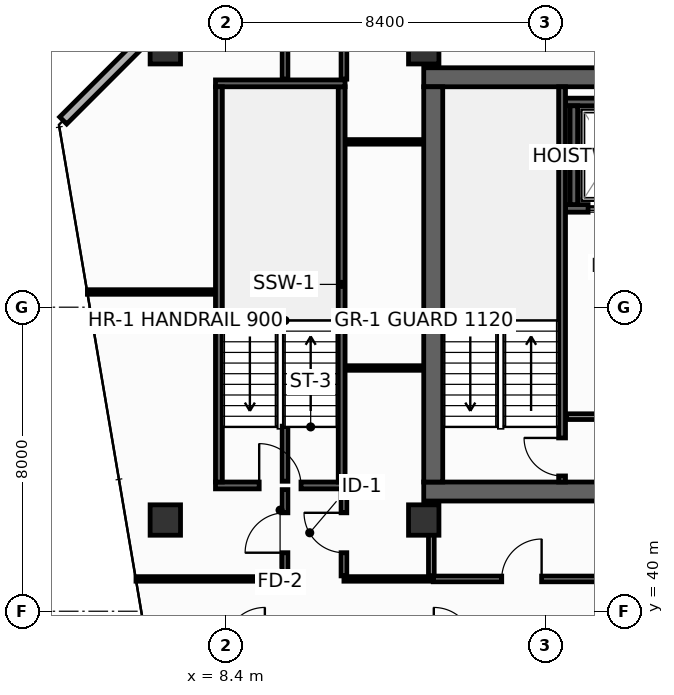
"""IFC4 building model, lengths in metres.
Left out: names, types, materials, properties, quantities, classifications, styles, units other than length and angle.
Written with IfcOpenShell. Run it as: python <this file> out.ifc"""

import sys

from ifc_helpers import new_model, si_unit, direction, frame, frame_2d, origin, origin_2d, place, context, subcontext, project, spatial, rectangle, hollow_rectangle, extrude, element, fill, save


model = new_model("IFC4")
c1 = context("Model", 3, precision=1e-05, world=origin(), true_north=direction((0.0, 1.0)))
c2 = subcontext(c1, "Body", "Model", "MODEL_VIEW")
j1 = project(units=[si_unit("LENGTHUNIT", "METRE"), si_unit("PLANEANGLEUNIT", "RADIAN")], contexts=[c1])
p1 = place(None, origin())
s1 = spatial("IfcSite", under=j1, at=p1, CompositionType="ELEMENT")
p2 = place(p1, origin())
s2 = spatial("IfcBuilding", under=s1, at=p2, CompositionType="ELEMENT")
p3 = place(p2, frame((0.0, 0.0, 205.6)))
s3 = spatial("IfcBuildingStorey", under=s2, at=p3, CompositionType="ELEMENT", Elevation=205.6)
p4 = place(p3, frame((13.6, 43.15, 0.0), z_axis=(0.0, 0.0, 1.0), x_axis=(1.0, 0.0, 0.0)))
e1 = element("IfcWall", 1, at=p4, inside=s3, PredefinedType="SHEAR", context=c2, shape_type="SweptSolid", body=[
    extrude(rectangle(XDim=32.7, YDim=0.5, at=frame_2d((16.35, 0.0))), origin(), (0.0, 0.0, 1.0), 3.55),
])
p5 = place(p4, frame((5.4, 0.0, 0.0)))
e2 = element("IfcOpeningElement", 2, at=p5, cuts=e1, PredefinedType="OPENING", context=c2, shape_type="SweptSolid", body=[
    extrude(rectangle(XDim=1.1, YDim=2.15, at=frame_2d((0.55, 1.075))), frame((0.0, 0.26, 0.0), z_axis=(0.0, -1.0, 0.0), x_axis=(1.0, 0.0, 0.0)), (0.0, 0.0, 1.0), 0.52),
])
p6 = place(p4, frame((25.6, 0.0, 0.0)))
e3 = element("IfcOpeningElement", 3, at=p6, cuts=e1, PredefinedType="OPENING", context=c2, shape_type="SweptSolid", body=[
    extrude(rectangle(XDim=1.1, YDim=2.15, at=frame_2d((0.55, 1.075))), frame((0.0, 0.26, 0.0), z_axis=(0.0, -1.0, 0.0), x_axis=(1.0, 0.0, 0.0)), (0.0, 0.0, 1.0), 0.52),
])
p7 = place(p3, frame((13.6, 54.05, 0.0), z_axis=(0.0, 0.0, 1.0), x_axis=(1.0, 0.0, 0.0)))
e4 = element("IfcWall", 4, at=p7, inside=s3, PredefinedType="SHEAR", context=c2, shape_type="SweptSolid", body=[
    extrude(rectangle(XDim=32.7, YDim=0.5, at=frame_2d((16.35, 0.0))), origin(), (0.0, 0.0, 1.0), 3.55),
])
p8 = place(p3, frame((13.85, 43.4, 0.0), z_axis=(0.0, 0.0, 1.0), x_axis=(0.0, 1.0, 0.0)))
e5 = element("IfcWall", 5, at=p8, inside=s3, PredefinedType="SHEAR", context=c2, shape_type="SweptSolid", body=[
    extrude(rectangle(XDim=10.4, YDim=0.5, at=frame_2d((5.2, 0.0))), origin(), (0.0, 0.0, 1.0), 3.55),
])
for number, where, z_axis, x_axis in (
    (6, (6.8, 54.8, 0.0), (0.0, 0.0, 1.0), (1.0, 0.0, 0.0)),
    (7, (13.6, 54.8, 0.0), (0.0, 0.0, 1.0), (1.0, 0.0, 0.0)),
    (8, (6.8, 42.4, 0.0), (0.0, 0.0, 1.0), (1.0, 0.0, 0.0)),
    (9, (13.6, 42.4, 0.0), (0.0, 0.0, 1.0), (1.0, 0.0, 0.0)),
):
    element("IfcColumn", number, at=place(p3, frame(where, z_axis=z_axis, x_axis=x_axis)), inside=s3, PredefinedType="COLUMN", context=c2, shape_type="SweptSolid", body=[
        extrude(hollow_rectangle(XDim=0.8, YDim=0.8, WallThickness=0.036, at=origin_2d()), origin(), (0.0, 0.0, 1.0), 3.8),
    ])
p9 = place(p3, frame((17.33, 50.6, 0.0), z_axis=(0.0, 0.0, 1.0), x_axis=(1.0, 0.0, 0.0)))
e10 = element("IfcWall", 10, at=p9, inside=s3, PredefinedType="SHEAR", context=c2, shape_type="SweptSolid", body=[
    extrude(rectangle(XDim=2.52, YDim=0.2, at=frame_2d((1.26, 0.0))), origin(), (0.0, 0.0, 1.0), 3.55),
])
p10 = place(p9, frame((0.595, 0.0, 0.0)))
e11 = element("IfcOpeningElement", 11, at=p10, cuts=e10, PredefinedType="OPENING", context=c2, shape_type="SweptSolid", body=[
    extrude(rectangle(XDim=1.25, YDim=2.3, at=frame_2d((0.625, 1.15))), frame((0.0, 0.11, 0.0), z_axis=(0.0, -1.0, 0.0), x_axis=(1.0, 0.0, 0.0)), (0.0, 0.0, 1.0), 0.22),
])
p11 = place(p3, frame((17.33, 53.4, 0.0), z_axis=(0.0, 0.0, 1.0), x_axis=(1.0, 0.0, 0.0)))
e12 = element("IfcWall", 12, at=p11, inside=s3, PredefinedType="SHEAR", context=c2, shape_type="SweptSolid", body=[
    extrude(rectangle(XDim=2.52, YDim=0.2, at=frame_2d((1.26, 0.0))), origin(), (0.0, 0.0, 1.0), 3.55),
])
p12 = place(p3, frame((17.55, 50.7, 0.0), z_axis=(0.0, 0.0, 1.0), x_axis=(0.0, 1.0, 0.0)))
e13 = element("IfcWall", 13, at=p12, inside=s3, PredefinedType="SHEAR", context=c2, shape_type="SweptSolid", body=[
    extrude(rectangle(XDim=2.6, YDim=0.2, at=frame_2d((1.3, 0.0))), origin(), (0.0, 0.0, 1.0), 3.55),
])
p13 = place(p3, frame((17.24, 43.4, 0.0), z_axis=(0.0, 0.0, 1.0), x_axis=(0.0, 1.0, 0.0)))
e14 = element("IfcWall", 14, at=p13, inside=s3, PredefinedType="SHEAR", context=c2, shape_type="SweptSolid", body=[
    extrude(rectangle(XDim=10.4, YDim=0.18, at=frame_2d((5.2, 0.0))), origin(), (0.0, 0.0, 1.0), 3.55),
])
p14 = place(p13, frame((0.16, 0.0, 0.0)))
e15 = element("IfcOpeningElement", 15, at=p14, cuts=e14, PredefinedType="OPENING", context=c2, shape_type="SweptSolid", body=[
    extrude(rectangle(XDim=1.0, YDim=2.15, at=frame_2d((0.5, 1.075))), frame((0.0, 0.1, 0.0), z_axis=(0.0, -1.0, 0.0), x_axis=(1.0, 0.0, 0.0)), (0.0, 0.0, 1.0), 0.2),
])
p15 = place(p3, frame((8.12, 43.31, 0.0), z_axis=(0.0, 0.0, 1.0), x_axis=(1.0, 0.0, 0.0)))
e16 = element("IfcWall", 16, at=p15, inside=s3, PredefinedType="SHEAR", context=c2, shape_type="SweptSolid", body=[
    extrude(rectangle(XDim=3.41, YDim=0.18, at=frame_2d((1.705, 0.0))), origin(), (0.0, 0.0, 1.0), 3.55),
])
p16 = place(p15, frame((1.15, 0.0, 0.0)))
e17 = element("IfcOpeningElement", 17, at=p16, cuts=e16, PredefinedType="OPENING", context=c2, shape_type="SweptSolid", body=[
    extrude(rectangle(XDim=1.1, YDim=2.15, at=frame_2d((0.55, 1.075))), frame((0.0, 0.1, 0.0), z_axis=(0.0, -1.0, 0.0), x_axis=(1.0, 0.0, 0.0)), (0.0, 0.0, 1.0), 0.2),
])
p17 = place(p3, frame((11.44, 43.4, 0.0), z_axis=(0.0, 0.0, 1.0), x_axis=(0.0, 1.0, 0.0)))
e18 = element("IfcWall", 18, at=p17, inside=s3, PredefinedType="SHEAR", context=c2, shape_type="SweptSolid", body=[
    extrude(rectangle(XDim=10.4, YDim=0.18, at=frame_2d((5.2, 0.0))), origin(), (0.0, 0.0, 1.0), 3.55),
])
p18 = place(p3, frame((11.53, 53.89, 0.0), z_axis=(0.0, 0.0, 1.0), x_axis=(-1.0, 0.0, 0.0)))
e19 = element("IfcWall", 19, at=p18, inside=s3, PredefinedType="SHEAR", context=c2, shape_type="SweptSolid", body=[
    extrude(rectangle(XDim=3.41, YDim=0.18, at=frame_2d((1.705, 0.0))), origin(), (0.0, 0.0, 1.0), 3.55),
])
p19 = place(p3, frame((8.21, 53.8, 0.0), z_axis=(0.0, 0.0, 1.0), x_axis=(0.0, -1.0, 0.0)))
e20 = element("IfcWall", 20, at=p19, inside=s3, PredefinedType="SHEAR", context=c2, shape_type="SweptSolid", body=[
    extrude(rectangle(XDim=10.4, YDim=0.18, at=frame_2d((5.2, 0.0))), origin(), (0.0, 0.0, 1.0), 3.55),
])
p20 = place(p3, frame((17.36, 45.12, 0.0), z_axis=(0.0, 0.0, 1.0), x_axis=(1.0, 0.0, 0.0)))
e21 = element("IfcWall", 21, at=p20, inside=s3, PredefinedType="PARTITIONING", context=c2, shape_type="SweptSolid", body=[
    extrude(rectangle(XDim=5.14, YDim=0.15, at=frame_2d((2.57, 0.0))), origin(), (0.0, 0.0, 1.0), 3.55),
])
p21 = place(p20, frame((1.8, 0.0, 0.0)))
e22 = element("IfcOpeningElement", 22, at=p21, cuts=e21, PredefinedType="OPENING", context=c2, shape_type="SweptSolid", body=[
    extrude(rectangle(XDim=1.1, YDim=2.15, at=frame_2d((0.55, 1.075))), frame((0.0, 0.085, 0.0), z_axis=(0.0, -1.0, 0.0), x_axis=(1.0, 0.0, 0.0)), (0.0, 0.0, 1.0), 0.17),
])
p22 = place(p3, frame((7.087, 55.887, 0.0), z_axis=(0.0, 0.0, 1.0), x_axis=(-0.707106781187, -0.707106781187, 0.0)))
e23 = element("IfcWall", 23, at=p22, inside=s3, PredefinedType="STANDARD", context=c2, shape_type="SweptSolid", body=[
    extrude(rectangle(XDim=4.206, YDim=0.26, at=frame_2d((2.103, 0.0))), origin(), (0.0, 0.0, 1.0), 3.55),
])
p23 = place(p3, frame((6.028, 40.85, 0.0), z_axis=(0.0, 0.0, 1.0), x_axis=(1.0, 0.0, 0.0)))
e24 = element("IfcWall", 24, at=p23, inside=s3, PredefinedType="PARTITIONING", context=c2, shape_type="SweptSolid", body=[
    extrude(rectangle(XDim=3.922, YDim=0.12, at=frame_2d((1.961, 0.0))), origin(), (0.0, 0.0, 1.0), 3.035),
])
p24 = place(p3, frame((11.5, 40.85, 0.0), z_axis=(0.0, 0.0, 1.0), x_axis=(1.0, 0.0, 0.0)))
e25 = element("IfcWall", 25, at=p24, inside=s3, PredefinedType="PARTITIONING", context=c2, shape_type="SweptSolid", body=[
    extrude(rectangle(XDim=2.35, YDim=0.12, at=frame_2d((1.175, 0.0))), origin(), (0.0, 0.0, 1.0), 3.55),
])
p25 = place(p3, frame((11.55, 52.35, 0.0), z_axis=(0.0, 0.0, 1.0), x_axis=(1.0, 0.0, 0.0)))
e26 = element("IfcWall", 26, at=p25, inside=s3, PredefinedType="PARTITIONING", context=c2, shape_type="SweptSolid", body=[
    extrude(rectangle(XDim=2.03, YDim=0.12, at=frame_2d((1.015, 0.0))), origin(), (0.0, 0.0, 1.0), 3.55),
])
p26 = place(p3, frame((11.5, 54.0, 0.0), z_axis=(0.0, 0.0, 1.0), x_axis=(0.0, 1.0, 0.0)))
e27 = element("IfcWall", 27, at=p26, inside=s3, PredefinedType="PARTITIONING", context=c2, shape_type="SweptSolid", body=[
    extrude(rectangle(XDim=1.995, YDim=0.15, at=frame_2d((0.998, 0.0))), origin(), (0.0, 0.0, 1.0), 2.935),
])
p27 = place(p3, frame((4.75, 48.4, 0.0), z_axis=(0.0, 0.0, 1.0), x_axis=(1.0, 0.0, 0.0)))
e28 = element("IfcWall", 28, at=p27, inside=s3, PredefinedType="PARTITIONING", context=c2, shape_type="SweptSolid", body=[
    extrude(rectangle(XDim=3.35, YDim=0.12, at=frame_2d((1.675, 0.0))), origin(), (0.0, 0.0, 1.0), 2.835),
])
p28 = place(p3, frame((9.95, 40.93, 0.0), z_axis=(0.0, 0.0, 1.0), x_axis=(0.0, 1.0, 0.0)))
e29 = element("IfcWall", 29, at=p28, inside=s3, PredefinedType="PARTITIONING", context=c2, shape_type="SweptSolid", body=[
    extrude(rectangle(XDim=2.27, YDim=0.15, at=frame_2d((1.135, 0.0))), origin(), (0.0, 0.0, 1.0), 2.835),
])
p29 = place(p28, frame((0.61, 0.0, 0.0)))
e30 = element("IfcOpeningElement", 30, at=p29, cuts=e29, PredefinedType="OPENING", context=c2, shape_type="SweptSolid", body=[
    extrude(rectangle(XDim=1.05, YDim=2.15, at=frame_2d((0.525, 1.075))), frame((0.0, 0.085, 0.0), z_axis=(0.0, -1.0, 0.0), x_axis=(1.0, 0.0, 0.0)), (0.0, 0.0, 1.0), 0.17),
])
p30 = place(p3, frame((9.95, 43.42, 0.0), z_axis=(0.0, 0.0, 1.0), x_axis=(0.0, 1.0, 0.0)))
e31 = element("IfcWall", 31, at=p30, inside=s3, PredefinedType="PARTITIONING", context=c2, shape_type="SweptSolid", body=[
    extrude(rectangle(XDim=1.45, YDim=0.15, at=frame_2d((0.725, 0.0))), origin(), (0.0, 0.0, 1.0), 3.55),
])
p31 = place(p3, frame((9.95, 54.0, 0.0), z_axis=(0.0, 0.0, 1.0), x_axis=(0.0, 1.0, 0.0)))
e32 = element("IfcWall", 32, at=p31, inside=s3, PredefinedType="PARTITIONING", context=c2, shape_type="SweptSolid", body=[
    extrude(rectangle(XDim=1.995, YDim=0.15, at=frame_2d((0.998, 0.0))), origin(), (0.0, 0.0, 1.0), 2.935),
])
p32 = place(p3, frame((11.55, 46.4, 0.0), z_axis=(0.0, 0.0, 1.0), x_axis=(1.0, 0.0, 0.0)))
e33 = element("IfcWall", 33, at=p32, inside=s3, PredefinedType="PARTITIONING", context=c2, shape_type="SweptSolid", body=[
    extrude(rectangle(XDim=2.03, YDim=0.12, at=frame_2d((1.015, 0.0))), origin(), (0.0, 0.0, 1.0), 3.55),
])
p33 = place(p3, frame((11.5, 40.93, 0.0), z_axis=(0.0, 0.0, 1.0), x_axis=(0.0, 1.0, 0.0)))
e34 = element("IfcWall", 34, at=p33, inside=s3, PredefinedType="PARTITIONING", context=c2, shape_type="SweptSolid", body=[
    extrude(rectangle(XDim=2.27, YDim=0.15, at=frame_2d((1.135, 0.0))), origin(), (0.0, 0.0, 1.0), 2.835),
])
p34 = place(p33, frame((0.61, 0.0, 0.0)))
e35 = element("IfcOpeningElement", 35, at=p34, cuts=e34, PredefinedType="OPENING", context=c2, shape_type="SweptSolid", body=[
    extrude(rectangle(XDim=1.05, YDim=2.15, at=frame_2d((0.525, 1.075))), frame((0.0, 0.085, 0.0), z_axis=(0.0, -1.0, 0.0), x_axis=(1.0, 0.0, 0.0)), (0.0, 0.0, 1.0), 0.17),
])
p35 = place(p3, frame((13.8, 40.93, 0.0), z_axis=(0.0, 0.0, 1.0), x_axis=(0.0, 1.0, 0.0)))
e36 = element("IfcWall", 36, at=p35, inside=s3, PredefinedType="PARTITIONING", context=c2, shape_type="SweptSolid", body=[
    extrude(rectangle(XDim=1.95, YDim=0.15, at=frame_2d((0.975, 0.0))), origin(), (0.0, 0.0, 1.0), 3.55),
])
p36 = place(p3, frame((13.85, 40.85, 0.0), z_axis=(0.0, 0.0, 1.0), x_axis=(1.0, 0.0, 0.0)))
e37 = element("IfcWall", 37, at=p36, inside=s3, PredefinedType="PARTITIONING", context=c2, shape_type="SweptSolid", body=[
    extrude(rectangle(XDim=4.655, YDim=0.15, at=frame_2d((2.327, 0.0))), origin(), (0.0, 0.0, 1.0), 3.55),
])
p37 = place(p36, frame((1.802, 0.0, 0.0)))
e38 = element("IfcOpeningElement", 38, at=p37, cuts=e37, PredefinedType="OPENING", context=c2, shape_type="SweptSolid", body=[
    extrude(rectangle(XDim=1.05, YDim=2.15, at=frame_2d((0.525, 1.075))), frame((0.0, 0.085, 0.0), z_axis=(0.0, -1.0, 0.0), x_axis=(1.0, 0.0, 0.0)), (0.0, 0.0, 1.0), 0.17),
])
p38 = place(p10, origin())
e39 = element("IfcDoor", 39, at=p38, inside=s3, OperationType="SLIDING_TO_LEFT", PredefinedType="DOOR", context=c2, shape_type="SweptSolid", body=[
    extrude(rectangle(XDim=1.25, YDim=2.3, at=frame_2d((0.625, 1.15))), frame((0.0, 0.025, 0.0), z_axis=(0.0, -1.0, 0.0), x_axis=(1.0, 0.0, 0.0)), (0.0, 0.0, 1.0), 0.05),
])
fill(e11, e39)
p39 = place(p14, origin())
e40 = element("IfcDoor", 40, at=p39, inside=s3, OperationType="SINGLE_SWING_RIGHT", PredefinedType="DOOR", context=c2, shape_type="SweptSolid", body=[
    extrude(rectangle(XDim=1.0, YDim=2.15, at=frame_2d((0.5, 1.075))), frame((0.0, 0.025, 0.0), z_axis=(0.0, -1.0, 0.0), x_axis=(1.0, 0.0, 0.0)), (0.0, 0.0, 1.0), 0.05),
])
fill(e15, e40)
p40 = place(p16, origin())
e41 = element("IfcDoor", 41, at=p40, inside=s3, OperationType="SINGLE_SWING_LEFT", PredefinedType="DOOR", context=c2, shape_type="SweptSolid", body=[
    extrude(rectangle(XDim=1.1, YDim=2.15, at=frame_2d((0.55, 1.075))), frame((0.0, 0.025, 0.0), z_axis=(0.0, -1.0, 0.0), x_axis=(1.0, 0.0, 0.0)), (0.0, 0.0, 1.0), 0.05),
])
fill(e17, e41)
p41 = place(p29, origin())
e42 = element("IfcDoor", 42, at=p41, inside=s3, OperationType="SINGLE_SWING_LEFT", PredefinedType="DOOR", context=c2, shape_type="SweptSolid", body=[
    extrude(rectangle(XDim=1.05, YDim=2.15, at=frame_2d((0.525, 1.075))), frame((0.0, 0.025, 0.0), z_axis=(0.0, -1.0, 0.0), x_axis=(1.0, 0.0, 0.0)), (0.0, 0.0, 1.0), 0.05),
])
fill(e30, e42)
p42 = place(p34, origin())
e43 = element("IfcDoor", 43, at=p42, inside=s3, OperationType="SINGLE_SWING_RIGHT", PredefinedType="DOOR", context=c2, shape_type="SweptSolid", body=[
    extrude(rectangle(XDim=1.05, YDim=2.15, at=frame_2d((0.525, 1.075))), frame((0.0, 0.025, 0.0), z_axis=(0.0, -1.0, 0.0), x_axis=(1.0, 0.0, 0.0)), (0.0, 0.0, 1.0), 0.05),
])
fill(e35, e43)
p43 = place(p37, origin())
e44 = element("IfcDoor", 44, at=p43, inside=s3, OperationType="SINGLE_SWING_RIGHT", PredefinedType="DOOR", context=c2, shape_type="SweptSolid", body=[
    extrude(rectangle(XDim=1.05, YDim=2.15, at=frame_2d((0.525, 1.075))), frame((0.0, 0.025, 0.0), z_axis=(0.0, -1.0, 0.0), x_axis=(1.0, 0.0, 0.0)), (0.0, 0.0, 1.0), 0.05),
])
fill(e38, e44)
save(model, sys.argv[1])
